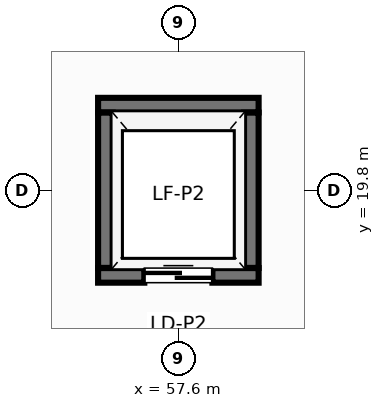
"""IFC4 building model, lengths in metres.
Left out: names, types, materials, properties, quantities, classifications, styles, units other than length and angle.
Written with IfcOpenShell. Run it as: python <this file> out.ifc"""

import sys

from ifc_helpers import new_model, si_unit, direction, frame, frame_2d, origin, place, context, subcontext, project, spatial, rectangle, extrude, element, fill, save


model = new_model("IFC4")
c1 = context("Model", 3, precision=1e-05, world=origin(), true_north=direction((0.0, 1.0)))
c2 = subcontext(c1, "Body", "Model", "MODEL_VIEW")
j1 = project(units=[si_unit("LENGTHUNIT", "METRE"), si_unit("PLANEANGLEUNIT", "RADIAN")], contexts=[c1])
p1 = place(None, origin())
s1 = spatial("IfcSite", under=j1, at=p1, CompositionType="ELEMENT")
p2 = place(p1, origin())
s2 = spatial("IfcBuilding", under=s1, at=p2, CompositionType="ELEMENT")
p3 = place(p2, frame((0.0, 0.0, -5.4)))
s3 = spatial("IfcBuildingStorey", under=s2, at=p3, CompositionType="ELEMENT", Elevation=-5.4)
p4 = place(p3, frame((56.28, 18.4, 0.0), z_axis=(0.0, 0.0, 1.0), x_axis=(1.0, 0.0, 0.0)))
e1 = element("IfcWall", 1, at=p4, inside=s3, PredefinedType="SHEAR", context=c2, shape_type="SweptSolid", body=[
    extrude(rectangle(XDim=2.64, YDim=0.24, at=frame_2d((1.32, 0.0))), origin(), (0.0, 0.0, 1.0), 5.4),
])
p5 = place(p4, frame((0.76, 0.0, 0.0)))
e2 = element("IfcOpeningElement", 2, at=p5, cuts=e1, PredefinedType="OPENING", context=c2, shape_type="SweptSolid", body=[
    extrude(rectangle(XDim=1.12, YDim=2.0, at=frame_2d((0.56, 1.0))), frame((0.0, 0.13, 0.0), z_axis=(0.0, -1.0, 0.0), x_axis=(1.0, 0.0, 0.0)), (0.0, 0.0, 1.0), 0.26),
])
p6 = place(p3, frame((58.92, 21.2, 0.0), z_axis=(0.0, 0.0, 1.0), x_axis=(-1.0, 0.0, 0.0)))
e3 = element("IfcWall", 3, at=p6, inside=s3, PredefinedType="SHEAR", context=c2, shape_type="SweptSolid", body=[
    extrude(rectangle(XDim=2.64, YDim=0.24, at=frame_2d((1.32, 0.0))), origin(), (0.0, 0.0, 1.0), 5.4),
])
for number, where, z_axis, x_axis in (
    (4, (56.4, 18.523, 0.0), (0.0, 0.0, 1.0), (0.0, 1.0, 0.0)),
    (5, (58.8, 18.523, 0.0), (0.0, 0.0, 1.0), (0.0, 1.0, 0.0)),
):
    element("IfcWall", number, at=place(p3, frame(where, z_axis=z_axis, x_axis=x_axis)), inside=s3, PredefinedType="SHEAR", context=c2, shape_type="SweptSolid", body=[
        extrude(rectangle(XDim=2.554, YDim=0.24, at=frame_2d((1.277, 0.0))), origin(), (0.0, 0.0, 1.0), 5.4),
    ])
p7 = place(p5, origin())
e6 = element("IfcDoor", 6, at=p7, inside=s3, OperationType="DOUBLE_DOOR_SLIDING", PredefinedType="USERDEFINED", context=c2, shape_type="SweptSolid", body=[
    extrude(rectangle(XDim=1.12, YDim=2.0, at=frame_2d((0.56, 1.0))), frame((0.0, 0.025, 0.0), z_axis=(0.0, -1.0, 0.0), x_axis=(1.0, 0.0, 0.0)), (0.0, 0.0, 1.0), 0.05),
])
fill(e2, e6)
save(model, sys.argv[1])
